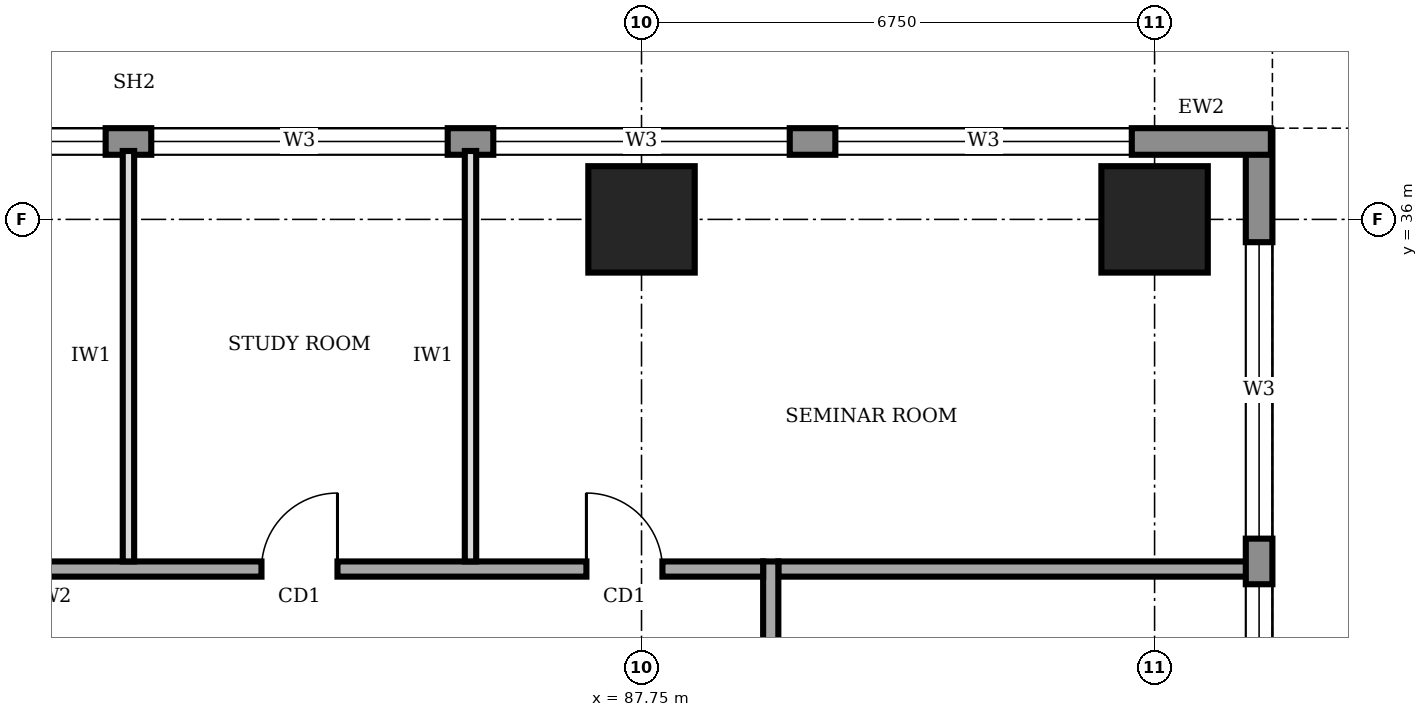
"""IFC4 building model, lengths in metres.
Left out: names, types, materials, properties, quantities, classifications, styles, units other than length and angle.
Written with IfcOpenShell. Run it as: python <this file> out.ifc"""

import sys

from ifc_helpers import new_model, si_unit, direction, frame, frame_2d, origin, origin_2d, place, context, subcontext, project, spatial, rectangle, extrude, element, fill, save


model = new_model("IFC4")
c1 = context("Model", 3, precision=1e-05, world=origin(), true_north=direction((0.0, 1.0)))
c2 = subcontext(c1, "Body", "Model", "MODEL_VIEW")
j1 = project(units=[si_unit("LENGTHUNIT", "METRE"), si_unit("PLANEANGLEUNIT", "RADIAN")], contexts=[c1])
p1 = place(None, origin())
s1 = spatial("IfcSite", under=j1, at=p1, CompositionType="ELEMENT")
p2 = place(p1, origin())
s2 = spatial("IfcBuilding", under=s1, at=p2, CompositionType="ELEMENT")
p3 = place(p2, frame((0.0, 0.0, 201.0)))
s3 = spatial("IfcBuildingStorey", under=s2, at=p3, CompositionType="ELEMENT", Elevation=201.0)
for number, where, z_axis, x_axis in (
    (1, (87.75, 36.0, 0.0), (0.0, 0.0, 1.0), (1.0, 0.0, 0.0)),
    (2, (94.5, 36.0, 0.0), (0.0, 0.0, 1.0), (1.0, 0.0, 0.0)),
):
    element("IfcColumn", number, at=place(p3, frame(where, z_axis=z_axis, x_axis=x_axis)), inside=s3, PredefinedType="COLUMN", context=c2, shape_type="SweptSolid", body=[
        extrude(rectangle(XDim=1.4, YDim=1.4, at=origin_2d()), origin(), (0.0, 0.0, 1.0), 4.0),
    ])
p4 = place(p3, frame((95.875, 3.32, 0.0), z_axis=(0.0, 0.0, 1.0), x_axis=(0.0, 1.0, 0.0)))
e3 = element("IfcWall", 3, at=p4, inside=s3, PredefinedType="STANDARD", context=c2, shape_type="SweptSolid", body=[
    extrude(rectangle(XDim=33.86, YDim=0.35, at=frame_2d((16.93, 0.0))), origin(), (0.0, 0.0, 1.0), 3.75),
])
p5 = place(p4, frame((1.48, 0.0, 0.95)))
e4 = element("IfcOpeningElement", 4, at=p5, cuts=e3, PredefinedType="OPENING", context=c2, shape_type="SweptSolid", body=[
    extrude(rectangle(XDim=3.9, YDim=1.8, at=frame_2d((1.95, 0.9))), frame((0.0, 0.185, 0.0), z_axis=(0.0, -1.0, 0.0), x_axis=(1.0, 0.0, 0.0)), (0.0, 0.0, 1.0), 0.37),
])
p6 = place(p4, frame((5.98, 0.0, 0.95)))
e5 = element("IfcOpeningElement", 5, at=p6, cuts=e3, PredefinedType="OPENING", context=c2, shape_type="SweptSolid", body=[
    extrude(rectangle(XDim=3.9, YDim=1.8, at=frame_2d((1.95, 0.9))), frame((0.0, 0.185, 0.0), z_axis=(0.0, -1.0, 0.0), x_axis=(1.0, 0.0, 0.0)), (0.0, 0.0, 1.0), 0.37),
])
p7 = place(p4, frame((10.48, 0.0, 0.95)))
e6 = element("IfcOpeningElement", 6, at=p7, cuts=e3, PredefinedType="OPENING", context=c2, shape_type="SweptSolid", body=[
    extrude(rectangle(XDim=3.9, YDim=1.8, at=frame_2d((1.95, 0.9))), frame((0.0, 0.185, 0.0), z_axis=(0.0, -1.0, 0.0), x_axis=(1.0, 0.0, 0.0)), (0.0, 0.0, 1.0), 0.37),
])
p8 = place(p4, frame((14.98, 0.0, 0.95)))
e7 = element("IfcOpeningElement", 7, at=p8, cuts=e3, PredefinedType="OPENING", context=c2, shape_type="SweptSolid", body=[
    extrude(rectangle(XDim=3.9, YDim=1.8, at=frame_2d((1.95, 0.9))), frame((0.0, 0.185, 0.0), z_axis=(0.0, -1.0, 0.0), x_axis=(1.0, 0.0, 0.0)), (0.0, 0.0, 1.0), 0.37),
])
p9 = place(p4, frame((19.48, 0.0, 0.95)))
e8 = element("IfcOpeningElement", 8, at=p9, cuts=e3, PredefinedType="OPENING", context=c2, shape_type="SweptSolid", body=[
    extrude(rectangle(XDim=3.9, YDim=1.8, at=frame_2d((1.95, 0.9))), frame((0.0, 0.185, 0.0), z_axis=(0.0, -1.0, 0.0), x_axis=(1.0, 0.0, 0.0)), (0.0, 0.0, 1.0), 0.37),
])
p10 = place(p4, frame((23.98, 0.0, 0.95)))
e9 = element("IfcOpeningElement", 9, at=p10, cuts=e3, PredefinedType="OPENING", context=c2, shape_type="SweptSolid", body=[
    extrude(rectangle(XDim=3.9, YDim=1.8, at=frame_2d((1.95, 0.9))), frame((0.0, 0.185, 0.0), z_axis=(0.0, -1.0, 0.0), x_axis=(1.0, 0.0, 0.0)), (0.0, 0.0, 1.0), 0.37),
])
p11 = place(p4, frame((28.48, 0.0, 0.95)))
e10 = element("IfcOpeningElement", 10, at=p11, cuts=e3, PredefinedType="OPENING", context=c2, shape_type="SweptSolid", body=[
    extrude(rectangle(XDim=3.9, YDim=1.8, at=frame_2d((1.95, 0.9))), frame((0.0, 0.185, 0.0), z_axis=(0.0, -1.0, 0.0), x_axis=(1.0, 0.0, 0.0)), (0.0, 0.0, 1.0), 0.37),
])
p12 = place(p3, frame((96.03, 37.025, 0.0), z_axis=(0.0, 0.0, 1.0), x_axis=(-1.0, 0.0, 0.0)))
e11 = element("IfcWall", 11, at=p12, inside=s3, PredefinedType="STANDARD", context=c2, shape_type="SweptSolid", body=[
    extrude(rectangle(XDim=29.91, YDim=0.35, at=frame_2d((14.955, 0.0))), origin(), (0.0, 0.0, 1.0), 3.75),
])
p13 = place(p12, frame((24.33, 0.0, 0.95)))
e12 = element("IfcOpeningElement", 12, at=p13, cuts=e11, PredefinedType="OPENING", context=c2, shape_type="SweptSolid", body=[
    extrude(rectangle(XDim=3.9, YDim=1.8, at=frame_2d((1.95, 0.9))), frame((0.0, 0.185, 0.0), z_axis=(0.0, -1.0, 0.0), x_axis=(1.0, 0.0, 0.0)), (0.0, 0.0, 1.0), 0.37),
])
p14 = place(p12, frame((19.83, 0.0, 0.95)))
e13 = element("IfcOpeningElement", 13, at=p14, cuts=e11, PredefinedType="OPENING", context=c2, shape_type="SweptSolid", body=[
    extrude(rectangle(XDim=3.9, YDim=1.8, at=frame_2d((1.95, 0.9))), frame((0.0, 0.185, 0.0), z_axis=(0.0, -1.0, 0.0), x_axis=(1.0, 0.0, 0.0)), (0.0, 0.0, 1.0), 0.37),
])
p15 = place(p12, frame((15.33, 0.0, 0.95)))
e14 = element("IfcOpeningElement", 14, at=p15, cuts=e11, PredefinedType="OPENING", context=c2, shape_type="SweptSolid", body=[
    extrude(rectangle(XDim=3.9, YDim=1.8, at=frame_2d((1.95, 0.9))), frame((0.0, 0.185, 0.0), z_axis=(0.0, -1.0, 0.0), x_axis=(1.0, 0.0, 0.0)), (0.0, 0.0, 1.0), 0.37),
])
p16 = place(p12, frame((10.83, 0.0, 0.95)))
e15 = element("IfcOpeningElement", 15, at=p16, cuts=e11, PredefinedType="OPENING", context=c2, shape_type="SweptSolid", body=[
    extrude(rectangle(XDim=3.9, YDim=1.8, at=frame_2d((1.95, 0.9))), frame((0.0, 0.185, 0.0), z_axis=(0.0, -1.0, 0.0), x_axis=(1.0, 0.0, 0.0)), (0.0, 0.0, 1.0), 0.37),
])
p17 = place(p12, frame((6.33, 0.0, 0.95)))
e16 = element("IfcOpeningElement", 16, at=p17, cuts=e11, PredefinedType="OPENING", context=c2, shape_type="SweptSolid", body=[
    extrude(rectangle(XDim=3.9, YDim=1.8, at=frame_2d((1.95, 0.9))), frame((0.0, 0.185, 0.0), z_axis=(0.0, -1.0, 0.0), x_axis=(1.0, 0.0, 0.0)), (0.0, 0.0, 1.0), 0.37),
])
p18 = place(p12, frame((1.83, 0.0, 0.95)))
e17 = element("IfcOpeningElement", 17, at=p18, cuts=e11, PredefinedType="OPENING", context=c2, shape_type="SweptSolid", body=[
    extrude(rectangle(XDim=3.9, YDim=1.8, at=frame_2d((1.95, 0.9))), frame((0.0, 0.185, 0.0), z_axis=(0.0, -1.0, 0.0), x_axis=(1.0, 0.0, 0.0)), (0.0, 0.0, 1.0), 0.37),
])
p19 = place(p3, frame((89.45, 9.2, 0.0), z_axis=(0.0, 0.0, 1.0), x_axis=(0.0, 1.0, 0.0)))
e18 = element("IfcWall", 18, at=p19, inside=s3, PredefinedType="SOLIDWALL", context=c2, shape_type="SweptSolid", body=[
    extrude(rectangle(XDim=22.3, YDim=0.2, at=frame_2d((11.15, 0.0))), origin(), (0.0, 0.0, 1.0), 3.75),
])
p20 = place(p19, frame((1.55, 0.0, 0.0)))
e19 = element("IfcOpeningElement", 19, at=p20, cuts=e18, PredefinedType="OPENING", context=c2, shape_type="SweptSolid", body=[
    extrude(rectangle(XDim=1.0, YDim=2.1, at=frame_2d((0.5, 1.05))), frame((0.0, 0.11, 0.0), z_axis=(0.0, -1.0, 0.0), x_axis=(1.0, 0.0, 0.0)), (0.0, 0.0, 1.0), 0.22),
])
p21 = place(p19, frame((5.05, 0.0, 0.0)))
e20 = element("IfcOpeningElement", 20, at=p21, cuts=e18, PredefinedType="OPENING", context=c2, shape_type="SweptSolid", body=[
    extrude(rectangle(XDim=0.9, YDim=2.1, at=frame_2d((0.45, 1.05))), frame((0.0, 0.11, 0.0), z_axis=(0.0, -1.0, 0.0), x_axis=(1.0, 0.0, 0.0)), (0.0, 0.0, 1.0), 0.22),
])
p22 = place(p19, frame((8.25, 0.0, 0.0)))
e21 = element("IfcOpeningElement", 21, at=p22, cuts=e18, PredefinedType="OPENING", context=c2, shape_type="SweptSolid", body=[
    extrude(rectangle(XDim=0.9, YDim=2.1, at=frame_2d((0.45, 1.05))), frame((0.0, 0.11, 0.0), z_axis=(0.0, -1.0, 0.0), x_axis=(1.0, 0.0, 0.0)), (0.0, 0.0, 1.0), 0.22),
])
p23 = place(p19, frame((13.8, 0.0, 0.0)))
e22 = element("IfcOpeningElement", 22, at=p23, cuts=e18, PredefinedType="OPENING", context=c2, shape_type="SweptSolid", body=[
    extrude(rectangle(XDim=0.9, YDim=2.1, at=frame_2d((0.45, 1.05))), frame((0.0, 0.11, 0.0), z_axis=(0.0, -1.0, 0.0), x_axis=(1.0, 0.0, 0.0)), (0.0, 0.0, 1.0), 0.22),
])
p24 = place(p19, frame((16.3, 0.0, 0.0)))
e23 = element("IfcOpeningElement", 23, at=p24, cuts=e18, PredefinedType="OPENING", context=c2, shape_type="SweptSolid", body=[
    extrude(rectangle(XDim=1.0, YDim=2.1, at=frame_2d((0.5, 1.05))), frame((0.0, 0.11, 0.0), z_axis=(0.0, -1.0, 0.0), x_axis=(1.0, 0.0, 0.0)), (0.0, 0.0, 1.0), 0.22),
])
p25 = place(p19, frame((11.2, 0.0, 0.0)))
e24 = element("IfcOpeningElement", 24, at=p25, cuts=e18, PredefinedType="OPENING", context=c2, shape_type="SweptSolid", body=[
    extrude(rectangle(XDim=1.0, YDim=2.1, at=frame_2d((0.5, 1.05))), frame((0.0, 0.11, 0.0), z_axis=(0.0, -1.0, 0.0), x_axis=(1.0, 0.0, 0.0)), (0.0, 0.0, 1.0), 0.22),
])
p26 = place(p19, frame((19.55, 0.0, 0.0)))
e25 = element("IfcOpeningElement", 25, at=p26, cuts=e18, PredefinedType="OPENING", context=c2, shape_type="SweptSolid", body=[
    extrude(rectangle(XDim=1.0, YDim=2.1, at=frame_2d((0.5, 1.05))), frame((0.0, 0.11, 0.0), z_axis=(0.0, -1.0, 0.0), x_axis=(1.0, 0.0, 0.0)), (0.0, 0.0, 1.0), 0.22),
])
p27 = place(p3, frame((89.35, 31.4, 0.0), z_axis=(0.0, 0.0, 1.0), x_axis=(-1.0, 0.0, 0.0)))
e26 = element("IfcWall", 26, at=p27, inside=s3, PredefinedType="SOLIDWALL", context=c2, shape_type="SweptSolid", body=[
    extrude(rectangle(XDim=16.9, YDim=0.2, at=frame_2d((8.45, 0.0))), origin(), (0.0, 0.0, 1.0), 3.75),
])
p28 = place(p27, frame((12.125, 0.0, 0.0)))
e27 = element("IfcOpeningElement", 27, at=p28, cuts=e26, PredefinedType="OPENING", context=c2, shape_type="SweptSolid", body=[
    extrude(rectangle(XDim=1.0, YDim=2.1, at=frame_2d((0.5, 1.05))), frame((0.0, 0.11, 0.0), z_axis=(0.0, -1.0, 0.0), x_axis=(1.0, 0.0, 0.0)), (0.0, 0.0, 1.0), 0.22),
])
p29 = place(p27, frame((5.6, 0.0, 0.0)))
e28 = element("IfcOpeningElement", 28, at=p29, cuts=e26, PredefinedType="OPENING", context=c2, shape_type="SweptSolid", body=[
    extrude(rectangle(XDim=1.0, YDim=2.1, at=frame_2d((0.5, 1.05))), frame((0.0, 0.11, 0.0), z_axis=(0.0, -1.0, 0.0), x_axis=(1.0, 0.0, 0.0)), (0.0, 0.0, 1.0), 0.22),
])
p30 = place(p27, frame((1.325, 0.0, 0.0)))
e29 = element("IfcOpeningElement", 29, at=p30, cuts=e26, PredefinedType="OPENING", context=c2, shape_type="SweptSolid", body=[
    extrude(rectangle(XDim=1.0, YDim=2.1, at=frame_2d((0.5, 1.05))), frame((0.0, 0.11, 0.0), z_axis=(0.0, -1.0, 0.0), x_axis=(1.0, 0.0, 0.0)), (0.0, 0.0, 1.0), 0.22),
])
p31 = place(p3, frame((89.55, 31.4, 0.0), z_axis=(0.0, 0.0, 1.0), x_axis=(1.0, 0.0, 0.0)))
e30 = element("IfcWall", 30, at=p31, inside=s3, PredefinedType="SOLIDWALL", context=c2, shape_type="SweptSolid", body=[
    extrude(rectangle(XDim=6.2, YDim=0.2, at=frame_2d((3.1, 0.0))), origin(), (0.0, 0.0, 1.0), 3.75),
])
for number, where, z_axis, x_axis in (
    (31, (81.0, 31.5, 0.0), (0.0, 0.0, 1.0), (0.0, 1.0, 0.0)),
    (32, (85.5, 31.5, 0.0), (0.0, 0.0, 1.0), (0.0, 1.0, 0.0)),
):
    element("IfcWall", number, at=place(p3, frame(where, z_axis=z_axis, x_axis=x_axis)), inside=s3, PredefinedType="PARTITIONING", context=c2, shape_type="SweptSolid", body=[
        extrude(rectangle(XDim=5.4, YDim=0.15, at=frame_2d((2.7, 0.0))), origin(), (0.0, 0.0, 1.0), 3.75),
    ])
p32 = place(p10, origin())
e33 = element("IfcWindow", 33, at=p32, inside=s3, PartitioningType="SINGLE_PANEL", PredefinedType="WINDOW", context=c2, shape_type="SweptSolid", body=[
    extrude(rectangle(XDim=3.9, YDim=1.8, at=frame_2d((1.95, 0.9))), frame((0.0, 0.03, 0.0), z_axis=(0.0, -1.0, 0.0), x_axis=(1.0, 0.0, 0.0)), (0.0, 0.0, 1.0), 0.06),
])
fill(e9, e33)
p33 = place(p11, origin())
e34 = element("IfcWindow", 34, at=p33, inside=s3, PartitioningType="SINGLE_PANEL", PredefinedType="WINDOW", context=c2, shape_type="SweptSolid", body=[
    extrude(rectangle(XDim=3.9, YDim=1.8, at=frame_2d((1.95, 0.9))), frame((0.0, 0.03, 0.0), z_axis=(0.0, -1.0, 0.0), x_axis=(1.0, 0.0, 0.0)), (0.0, 0.0, 1.0), 0.06),
])
fill(e10, e34)
p34 = place(p15, origin())
e35 = element("IfcWindow", 35, at=p34, inside=s3, PartitioningType="SINGLE_PANEL", PredefinedType="WINDOW", context=c2, shape_type="SweptSolid", body=[
    extrude(rectangle(XDim=3.9, YDim=1.8, at=frame_2d((1.95, 0.9))), frame((0.0, 0.03, 0.0), z_axis=(0.0, -1.0, 0.0), x_axis=(1.0, 0.0, 0.0)), (0.0, 0.0, 1.0), 0.06),
])
fill(e14, e35)
p35 = place(p16, origin())
e36 = element("IfcWindow", 36, at=p35, inside=s3, PartitioningType="SINGLE_PANEL", PredefinedType="WINDOW", context=c2, shape_type="SweptSolid", body=[
    extrude(rectangle(XDim=3.9, YDim=1.8, at=frame_2d((1.95, 0.9))), frame((0.0, 0.03, 0.0), z_axis=(0.0, -1.0, 0.0), x_axis=(1.0, 0.0, 0.0)), (0.0, 0.0, 1.0), 0.06),
])
fill(e15, e36)
p36 = place(p17, origin())
e37 = element("IfcWindow", 37, at=p36, inside=s3, PartitioningType="SINGLE_PANEL", PredefinedType="WINDOW", context=c2, shape_type="SweptSolid", body=[
    extrude(rectangle(XDim=3.9, YDim=1.8, at=frame_2d((1.95, 0.9))), frame((0.0, 0.03, 0.0), z_axis=(0.0, -1.0, 0.0), x_axis=(1.0, 0.0, 0.0)), (0.0, 0.0, 1.0), 0.06),
])
fill(e16, e37)
p37 = place(p18, origin())
e38 = element("IfcWindow", 38, at=p37, inside=s3, PartitioningType="SINGLE_PANEL", PredefinedType="WINDOW", context=c2, shape_type="SweptSolid", body=[
    extrude(rectangle(XDim=3.9, YDim=1.8, at=frame_2d((1.95, 0.9))), frame((0.0, 0.03, 0.0), z_axis=(0.0, -1.0, 0.0), x_axis=(1.0, 0.0, 0.0)), (0.0, 0.0, 1.0), 0.06),
])
fill(e17, e38)
p38 = place(p29, frame((1.0, 0.0, 0.0), z_axis=(0.0, 0.0, 1.0), x_axis=(-1.0, 0.0, 0.0)))
e39 = element("IfcDoor", 39, at=p38, inside=s3, OperationType="SINGLE_SWING_RIGHT", PredefinedType="DOOR", context=c2, shape_type="SweptSolid", body=[
    extrude(rectangle(XDim=1.0, YDim=2.1, at=frame_2d((0.5, 1.05))), frame((0.0, 0.025, 0.0), z_axis=(0.0, -1.0, 0.0), x_axis=(1.0, 0.0, 0.0)), (0.0, 0.0, 1.0), 0.05),
])
fill(e28, e39)
p39 = place(p30, frame((1.0, 0.0, 0.0), z_axis=(0.0, 0.0, 1.0), x_axis=(-1.0, 0.0, 0.0)))
e40 = element("IfcDoor", 40, at=p39, inside=s3, OperationType="SINGLE_SWING_LEFT", PredefinedType="DOOR", context=c2, shape_type="SweptSolid", body=[
    extrude(rectangle(XDim=1.0, YDim=2.1, at=frame_2d((0.5, 1.05))), frame((0.0, 0.025, 0.0), z_axis=(0.0, -1.0, 0.0), x_axis=(1.0, 0.0, 0.0)), (0.0, 0.0, 1.0), 0.05),
])
fill(e29, e40)
save(model, sys.argv[1])
